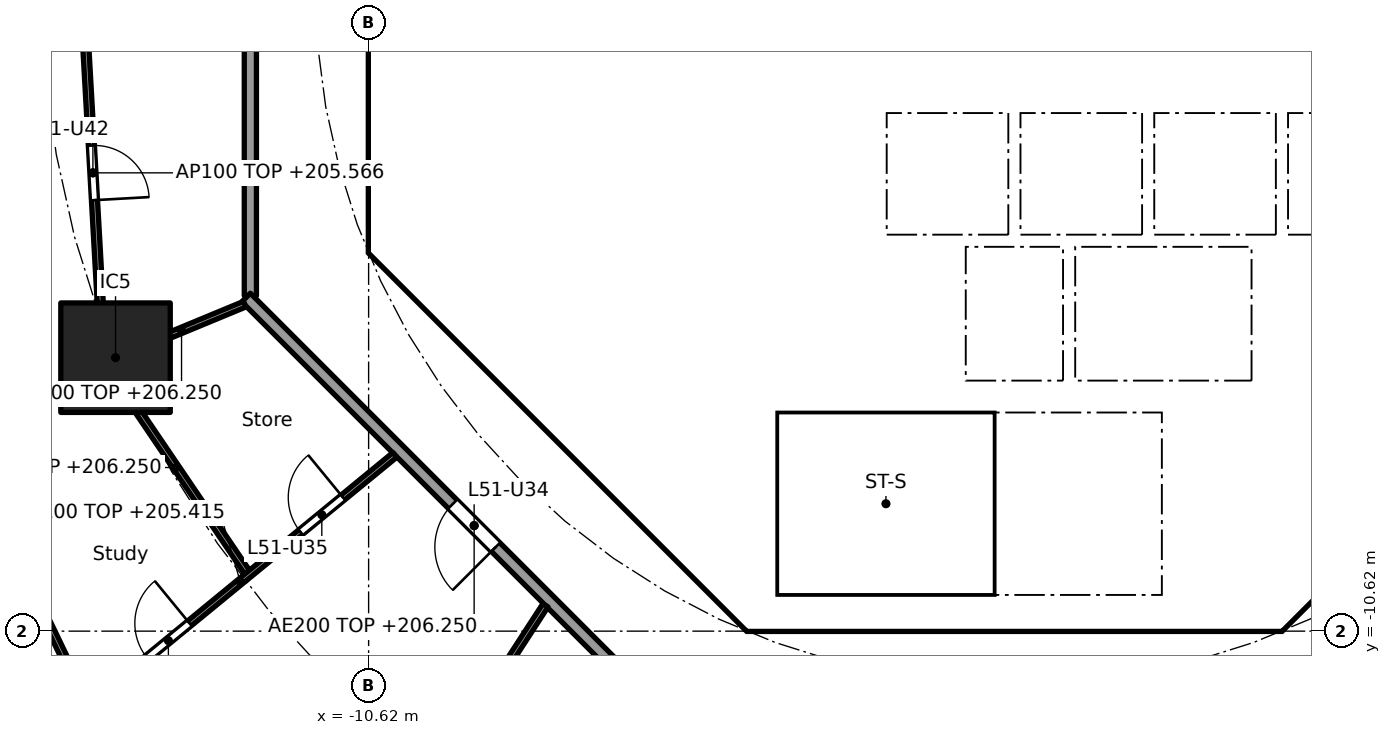
"""IFC4 building model, lengths in metres.
Left out: names, types, materials, properties, quantities, classifications, styles, units other than length and angle.
Written with IfcOpenShell. Run it as: python <this file> out.ifc"""

import sys

from ifc_helpers import new_model, si_unit, direction, frame, frame_2d, origin, origin_2d, place, context, subcontext, project, spatial, polyline, rectangle, outline, extrude, element, fill, save


model = new_model("IFC4")
c1 = context("Model", 3, precision=1e-05, world=origin(), true_north=direction((0.0, 1.0)))
c2 = subcontext(c1, "Body", "Model", "MODEL_VIEW")
j1 = project(units=[si_unit("LENGTHUNIT", "METRE"), si_unit("PLANEANGLEUNIT", "RADIAN")], contexts=[c1])
p1 = place(None, origin())
s1 = spatial("IfcSite", under=j1, at=p1, CompositionType="ELEMENT")
p2 = place(p1, origin())
s2 = spatial("IfcBuilding", under=s1, at=p2, CompositionType="ELEMENT")
p3 = place(p2, frame((0.0, 0.0, 202.9)))
s3 = spatial("IfcBuildingStorey", under=s2, at=p3, CompositionType="ELEMENT", Elevation=202.9)
p4 = place(p3, frame((-14.782, -6.123, 0.0), z_axis=(0.0, 0.0, 1.0), x_axis=(1.0, 0.0, 0.0)))
e1 = element("IfcColumn", 1, at=p4, inside=s3, PredefinedType="COLUMN", context=c2, shape_type="SweptSolid", body=[
    extrude(rectangle(XDim=1.8, YDim=1.8, at=origin_2d()), origin(), (0.0, 0.0, 1.0), 3.7),
])
p5 = place(p3, frame((-10.325, 3.801, 0.0), z_axis=(0.0, 0.0, 1.0), x_axis=(0.0, -1.0, 0.0)))
e2 = element("IfcWall", 2, at=p5, inside=s3, PredefinedType="SHEAR", context=c2, shape_type="SweptSolid", body=[
    extrude(rectangle(XDim=7.602, YDim=0.6, at=frame_2d((3.801, 0.0))), origin(), (0.0, 0.0, 1.0), 3.35),
])
p6 = place(p5, frame((0.651, 0.0, 0.0)))
e3 = element("IfcOpeningElement", 3, at=p6, cuts=e2, PredefinedType="OPENING", context=c2, shape_type="SweptSolid", body=[
    extrude(rectangle(XDim=1.5, YDim=2.1, at=frame_2d((0.75, 1.05))), frame((0.0, 0.31, 0.0), z_axis=(0.0, -1.0, 0.0), x_axis=(1.0, 0.0, 0.0)), (0.0, 0.0, 1.0), 0.62),
])
p7 = place(p5, frame((5.451, 0.0, 0.0)))
e4 = element("IfcOpeningElement", 4, at=p7, cuts=e2, PredefinedType="OPENING", context=c2, shape_type="SweptSolid", body=[
    extrude(rectangle(XDim=1.5, YDim=2.1, at=frame_2d((0.75, 1.05))), frame((0.0, 0.31, 0.0), z_axis=(0.0, -1.0, 0.0), x_axis=(1.0, 0.0, 0.0)), (0.0, 0.0, 1.0), 0.62),
])
p8 = place(p3, frame((-9.988, -4.613, 0.0), z_axis=(0.0, 0.0, 1.0), x_axis=(0.707106781187, -0.707106781187, 0.0)))
e5 = element("IfcWall", 5, at=p8, inside=s3, PredefinedType="SHEAR", context=c2, shape_type="SweptSolid", body=[
    extrude(rectangle(XDim=7.602, YDim=0.6, at=frame_2d((3.801, 0.0))), origin(), (0.0, 0.0, 1.0), 3.35),
])
p9 = place(p8, frame((6.151, 0.0, 0.0)))
e6 = element("IfcOpeningElement", 6, at=p9, cuts=e5, PredefinedType="OPENING", context=c2, shape_type="SweptSolid", body=[
    extrude(rectangle(XDim=1.1, YDim=2.1, at=frame_2d((0.55, 1.05))), frame((0.0, 0.31, 0.0), z_axis=(0.0, -1.0, 0.0), x_axis=(1.0, 0.0, 0.0)), (0.0, 0.0, 1.0), 0.62),
])
p10 = place(p3, frame((4.613, -9.988, 0.0), z_axis=(0.0, 0.0, 1.0), x_axis=(0.707106781187, 0.707106781187, 0.0)))
e7 = element("IfcWall", 7, at=p10, inside=s3, PredefinedType="SHEAR", context=c2, shape_type="SweptSolid", body=[
    extrude(rectangle(XDim=7.602, YDim=0.6, at=frame_2d((3.801, 0.0))), origin(), (0.0, 0.0, 1.0), 3.35),
])
p11 = place(p10, frame((3.201, 0.0, 0.0)))
e8 = element("IfcOpeningElement", 8, at=p11, cuts=e7, PredefinedType="OPENING", context=c2, shape_type="SweptSolid", body=[
    extrude(rectangle(XDim=1.2, YDim=2.1, at=frame_2d((0.6, 1.05))), frame((0.0, 0.31, 0.0), z_axis=(0.0, -1.0, 0.0), x_axis=(1.0, 0.0, 0.0)), (0.0, 0.0, 1.0), 0.62),
])
p12 = place(p3, frame((4.0, -10.025, 0.0), z_axis=(0.0, 0.0, 1.0), x_axis=(0.0, 1.0, 0.0)))
e9 = element("IfcWall", 9, at=p12, inside=s3, PredefinedType="SOLIDWALL", context=c2, shape_type="SweptSolid", body=[
    extrude(rectangle(XDim=3.0, YDim=0.2, at=frame_2d((1.5, 0.0))), origin(), (0.0, 0.0, 1.0), 3.35),
])
p13 = place(p12, frame((0.975, 0.0, 0.0)))
e10 = element("IfcOpeningElement", 10, at=p13, cuts=e9, PredefinedType="OPENING", context=c2, shape_type="SweptSolid", body=[
    extrude(rectangle(XDim=1.1, YDim=2.1, at=frame_2d((0.55, 1.05))), frame((0.0, 0.11, 0.0), z_axis=(0.0, -1.0, 0.0), x_axis=(1.0, 0.0, 0.0)), (0.0, 0.0, 1.0), 0.22),
])
p14 = place(p3, frame((-6.2, -7.827, 0.0), z_axis=(0.0, 0.0, 1.0), x_axis=(0.0, 1.0, 0.0)))
e11 = element("IfcWall", 11, at=p14, inside=s3, PredefinedType="PARTITIONING", context=c2, shape_type="SweptSolid", body=[
    extrude(rectangle(XDim=3.527, YDim=0.15, at=frame_2d((1.763, 0.0))), origin(), (0.0, 0.0, 1.0), 3.35),
])
p15 = place(p14, frame((2.365, 0.0, 0.0)))
e12 = element("IfcOpeningElement", 12, at=p15, cuts=e11, PredefinedType="OPENING", context=c2, shape_type="SweptSolid", body=[
    extrude(rectangle(XDim=0.9, YDim=2.1, at=frame_2d((0.45, 1.05))), frame((0.0, 0.085, 0.0), z_axis=(0.0, -1.0, 0.0), x_axis=(1.0, 0.0, 0.0)), (0.0, 0.0, 1.0), 0.17),
])
p16 = place(p14, frame((0.489, 0.0, 0.0)))
e13 = element("IfcOpeningElement", 13, at=p16, cuts=e11, PredefinedType="OPENING", context=c2, shape_type="SweptSolid", body=[
    extrude(rectangle(XDim=0.9, YDim=2.1, at=frame_2d((0.45, 1.05))), frame((0.0, 0.085, 0.0), z_axis=(0.0, -1.0, 0.0), x_axis=(1.0, 0.0, 0.0)), (0.0, 0.0, 1.0), 0.17),
])
p17 = place(p3, frame((4.0, -6.5, 0.0), z_axis=(0.0, 0.0, 1.0), x_axis=(0.0, 1.0, 0.0)))
e14 = element("IfcWall", 14, at=p17, inside=s3, PredefinedType="SOLIDWALL", context=c2, shape_type="SweptSolid", body=[
    extrude(rectangle(XDim=2.2, YDim=0.2, at=frame_2d((1.1, 0.0))), origin(), (0.0, 0.0, 1.0), 3.35),
])
p18 = place(p17, frame((0.55, 0.0, 0.0)))
e15 = element("IfcOpeningElement", 15, at=p18, cuts=e14, PredefinedType="OPENING", context=c2, shape_type="SweptSolid", body=[
    extrude(rectangle(XDim=1.1, YDim=2.1, at=frame_2d((0.55, 1.05))), frame((0.0, 0.11, 0.0), z_axis=(0.0, -1.0, 0.0), x_axis=(1.0, 0.0, 0.0)), (0.0, 0.0, 1.0), 0.22),
])
p19 = place(p3, frame((-4.0, -6.5, 0.0), z_axis=(0.0, 0.0, 1.0), x_axis=(0.0, 1.0, 0.0)))
e16 = element("IfcWall", 16, at=p19, inside=s3, PredefinedType="SOLIDWALL", context=c2, shape_type="SweptSolid", body=[
    extrude(rectangle(XDim=2.2, YDim=0.2, at=frame_2d((1.1, 0.0))), origin(), (0.0, 0.0, 1.0), 3.35),
])
p20 = place(p19, frame((0.65, 0.0, 0.0)))
e17 = element("IfcOpeningElement", 17, at=p20, cuts=e16, PredefinedType="OPENING", context=c2, shape_type="SweptSolid", body=[
    extrude(rectangle(XDim=0.9, YDim=2.1, at=frame_2d((0.45, 1.05))), frame((0.0, 0.11, 0.0), z_axis=(0.0, -1.0, 0.0), x_axis=(1.0, 0.0, 0.0)), (0.0, 0.0, 1.0), 0.22),
])
p21 = place(p3, frame((-6.7, -2.0, 0.0), z_axis=(0.0, 0.0, 1.0), x_axis=(1.0, 0.0, 0.0)))
e18 = element("IfcWall", 18, at=p21, inside=s3, PredefinedType="SOLIDWALL", context=c2, shape_type="SweptSolid", body=[
    extrude(rectangle(XDim=13.4, YDim=0.2, at=frame_2d((6.7, 0.0))), origin(), (0.0, 0.0, 1.0), 3.35),
])
p22 = place(p21, frame((5.05, 0.0, 0.0)))
e19 = element("IfcOpeningElement", 19, at=p22, cuts=e18, PredefinedType="OPENING", context=c2, shape_type="SweptSolid", body=[
    extrude(rectangle(XDim=1.1, YDim=2.1, at=frame_2d((0.55, 1.05))), frame((0.0, 0.11, 0.0), z_axis=(0.0, -1.0, 0.0), x_axis=(1.0, 0.0, 0.0)), (0.0, 0.0, 1.0), 0.22),
])
p23 = place(p21, frame((7.25, 0.0, 0.0)))
e20 = element("IfcOpeningElement", 20, at=p23, cuts=e18, PredefinedType="OPENING", context=c2, shape_type="SweptSolid", body=[
    extrude(rectangle(XDim=1.1, YDim=2.1, at=frame_2d((0.55, 1.05))), frame((0.0, 0.11, 0.0), z_axis=(0.0, -1.0, 0.0), x_axis=(1.0, 0.0, 0.0)), (0.0, 0.0, 1.0), 0.22),
])
p24 = place(p21, frame((0.75, 0.0, 0.0)))
e21 = element("IfcOpeningElement", 21, at=p24, cuts=e18, PredefinedType="OPENING", context=c2, shape_type="SweptSolid", body=[
    extrude(rectangle(XDim=0.9, YDim=2.1, at=frame_2d((0.45, 1.05))), frame((0.0, 0.11, 0.0), z_axis=(0.0, -1.0, 0.0), x_axis=(1.0, 0.0, 0.0)), (0.0, 0.0, 1.0), 0.22),
])
p25 = place(p21, frame((2.95, 0.0, 0.0)))
e22 = element("IfcOpeningElement", 22, at=p25, cuts=e18, PredefinedType="OPENING", context=c2, shape_type="SweptSolid", body=[
    extrude(rectangle(XDim=0.9, YDim=2.1, at=frame_2d((0.45, 1.05))), frame((0.0, 0.11, 0.0), z_axis=(0.0, -1.0, 0.0), x_axis=(1.0, 0.0, 0.0)), (0.0, 0.0, 1.0), 0.22),
])
p26 = place(p3, origin())
e23 = element("IfcWall", 23, at=p26, inside=s3, PredefinedType="SHEAR", context=c2, shape_type="SweptSolid", body=[
    extrude(outline(polyline([(-10.625, -3.801), (-10.025, -3.801), (-10.025, -4.152), (-9.776, -4.401), (-10.2, -4.825), (-10.625, -4.401), (-10.625, -3.801)])), origin(), (0.0, 0.0, 1.0), 3.35),
])
p27 = place(p3, origin())
e24 = element("IfcWall", 24, at=p27, inside=s3, PredefinedType="SHEAR", context=c2, shape_type="SweptSolid", body=[
    extrude(outline(polyline([(-4.152, -10.025), (4.152, -10.025), (4.401, -9.776), (4.825, -10.2), (4.401, -10.625), (-4.401, -10.625), (-4.825, -10.2), (-4.401, -9.776), (-4.152, -10.025)])), origin(), (0.0, 0.0, 1.0), 3.35),
])
for number, where, z_axis, x_axis in (
    (25, (-0.9, -6.5, 0.0), (0.0, 0.0, 1.0), (0.0, 1.0, 0.0)),
    (26, (0.9, -6.5, 0.0), (0.0, 0.0, 1.0), (0.0, 1.0, 0.0)),
):
    element("IfcWall", number, at=place(p3, frame(where, z_axis=z_axis, x_axis=x_axis)), inside=s3, PredefinedType="SOLIDWALL", context=c2, shape_type="SweptSolid", body=[
        extrude(rectangle(XDim=2.2, YDim=0.2, at=frame_2d((1.1, 0.0))), origin(), (0.0, 0.0, 1.0), 3.35),
    ])
p28 = place(p3, origin())
e27 = element("IfcWall", 27, at=p28, inside=s3, PredefinedType="SOLIDWALL", context=c2, shape_type="SweptSolid", body=[
    extrude(outline(polyline([(-6.7, -2.1), (-6.5, -2.1), (-6.5, -4.1), (-4.5, -4.1), (-4.5, -2.1), (-4.3, -2.1), (-4.3, -4.1), (-2.3, -4.1), (-2.3, -2.1), (-2.1, -2.1), (-2.1, -4.1), (-0.1, -4.1), (-0.1, -2.1), (0.1, -2.1), (0.1, -4.1), (2.1, -4.1), (2.1, -2.1), (2.3, -2.1), (2.3, -4.1), (4.3, -4.1), (4.3, -2.1), (4.5, -2.1), (4.5, -4.1), (6.5, -4.1), (6.5, -2.1), (6.7, -2.1), (6.7, -4.3), (-6.7, -4.3), (-6.7, -2.1)])), origin(), (0.0, 0.0, 1.0), 3.35),
])
p29 = place(p3, frame((-10.025, -4.0, 0.0), z_axis=(0.0, 0.0, 1.0), x_axis=(1.0, 0.0, 0.0)))
e28 = element("IfcWall", 28, at=p29, inside=s3, PredefinedType="PARTITIONING", context=c2, shape_type="SweptSolid", body=[
    extrude(rectangle(XDim=3.325, YDim=0.2, at=frame_2d((1.662, 0.0))), origin(), (0.0, 0.0, 1.0), 3.35),
])
p30 = place(p3, frame((-8.301, -5.8, 0.0), z_axis=(0.0, 0.0, 1.0), x_axis=(1.0, 0.0, 0.0)))
e29 = element("IfcWall", 29, at=p30, inside=s3, PredefinedType="PARTITIONING", context=c2, shape_type="SweptSolid", body=[
    extrude(rectangle(XDim=2.026, YDim=0.15, at=frame_2d((1.013, 0.0))), origin(), (0.0, 0.0, 1.0), 3.35),
])
p31 = place(p3, origin())
e30 = element("IfcWall", 30, at=p31, inside=s3, PredefinedType="SOLIDWALL", context=c2, shape_type="SweptSolid", body=[
    extrude(outline(polyline([(-3.9, -10.025), (-4.1, -10.025), (-4.1, -7.025), (-3.9, -7.025), (-3.9, -10.025)])), origin(), (0.0, 0.0, 1.0), 3.35),
])
p32 = place(p3, origin())
e31 = element("IfcWall", 31, at=p32, inside=s3, PredefinedType="SOLIDWALL", context=c2, shape_type="SweptSolid", body=[
    extrude(outline(polyline([(4.1, -7.025), (-4.1, -7.025), (-4.1, -6.5), (4.1, -6.5), (4.1, -7.025)])), origin(), (0.0, 0.0, 1.0), 3.35),
])
p33 = place(p3, frame((-12.565, 5.304, 0.0), z_axis=(0.0, 0.0, 1.0), x_axis=(0.0, -1.0, 0.0)))
e32 = element("IfcWall", 32, at=p33, inside=s3, PredefinedType="PARTITIONING", context=c2, shape_type="SweptSolid", body=[
    extrude(rectangle(XDim=10.409, YDim=0.2, at=frame_2d((5.205, 0.0))), origin(), (0.0, 0.0, 1.0), 3.35),
])
p34 = place(p3, frame((-12.635, -5.134, 0.0), z_axis=(0.0, 0.0, 1.0), x_axis=(0.707106781187, -0.707106781187, 0.0)))
e33 = element("IfcWall", 33, at=p34, inside=s3, PredefinedType="PARTITIONING", context=c2, shape_type="SweptSolid", body=[
    extrude(rectangle(XDim=10.609, YDim=0.2, at=frame_2d((5.305, 0.0))), origin(), (0.0, 0.0, 1.0), 3.35),
])
p35 = place(p34, frame((4.804, 0.0, 0.0)))
e34 = element("IfcOpeningElement", 34, at=p35, cuts=e33, PredefinedType="OPENING", context=c2, shape_type="SweptSolid", body=[
    extrude(rectangle(XDim=1.0, YDim=2.1, at=frame_2d((0.5, 1.05))), frame((0.0, 0.11, 0.0), z_axis=(0.0, -1.0, 0.0), x_axis=(1.0, 0.0, 0.0)), (0.0, 0.0, 1.0), 0.22),
])
p36 = place(p3, frame((-15.331, 0.05, 0.0), z_axis=(0.0, 0.0, 1.0), x_axis=(0.056325291522, -0.998412470643, 0.0)))
e35 = element("IfcWall", 35, at=p36, inside=s3, PredefinedType="PARTITIONING", context=c2, shape_type="SweptSolid", body=[
    extrude(rectangle(XDim=6.276, YDim=0.1, at=frame_2d((3.138, 0.0))), origin(), (0.0, 0.0, 1.0), 2.666),
])
p37 = place(p36, frame((2.688, 0.0, 0.0)))
e36 = element("IfcOpeningElement", 36, at=p37, cuts=e35, PredefinedType="OPENING", context=c2, shape_type="SweptSolid", body=[
    extrude(rectangle(XDim=0.9, YDim=2.1, at=frame_2d((0.45, 1.05))), frame((0.0, 0.06, 0.0), z_axis=(0.0, -1.0, 0.0), x_axis=(1.0, 0.0, 0.0)), (0.0, 0.0, 1.0), 0.12),
])
p38 = place(p3, frame((-12.657, -5.243, 0.0), z_axis=(0.0, 0.0, 1.0), x_axis=(-0.923864733477, -0.382719158442, 0.0)))
e37 = element("IfcWall", 37, at=p38, inside=s3, PredefinedType="PARTITIONING", context=c2, shape_type="SweptSolid", body=[
    extrude(rectangle(XDim=2.25, YDim=0.1, at=frame_2d((1.125, 0.0))), origin(), (0.0, 0.0, 1.0), 3.35),
])
p39 = place(p3, frame((-14.952, -6.208, 0.0), z_axis=(0.0, 0.0, 1.0), x_axis=(0.561064907171, -0.827771810308, 0.0)))
e38 = element("IfcWall", 38, at=p39, inside=s3, PredefinedType="PARTITIONING", context=c2, shape_type="SweptSolid", body=[
    extrude(rectangle(XDim=4.159, YDim=0.1, at=frame_2d((2.079, 0.0))), origin(), (0.0, 0.0, 1.0), 3.35),
])
p40 = place(p3, frame((-17.669, -6.809, 0.0), z_axis=(0.0, 0.0, 1.0), x_axis=(0.434040130629, -0.900893536997, 0.0)))
e39 = element("IfcWall", 39, at=p40, inside=s3, PredefinedType="PARTITIONING", context=c2, shape_type="SweptSolid", body=[
    extrude(rectangle(XDim=5.558, YDim=0.1, at=frame_2d((2.779, 0.0))), origin(), (0.0, 0.0, 1.0), 3.35),
])
p41 = place(p3, frame((-10.189, -7.721, 0.0), z_axis=(0.0, 0.0, 1.0), x_axis=(-0.773121441079, -0.634258021112, 0.0)))
e40 = element("IfcWall", 40, at=p41, inside=s3, PredefinedType="PARTITIONING", context=c2, shape_type="SweptSolid", body=[
    extrude(rectangle(XDim=6.577, YDim=0.1, at=frame_2d((3.289, 0.0))), origin(), (0.0, 0.0, 1.0), 2.515),
])
p42 = place(p41, frame((1.104, 0.0, 0.0)))
e41 = element("IfcOpeningElement", 41, at=p42, cuts=e40, PredefinedType="OPENING", context=c2, shape_type="SweptSolid", body=[
    extrude(rectangle(XDim=0.9, YDim=2.1, at=frame_2d((0.45, 1.05))), frame((0.0, 0.06, 0.0), z_axis=(0.0, -1.0, 0.0), x_axis=(1.0, 0.0, 0.0)), (0.0, 0.0, 1.0), 0.12),
])
p43 = place(p41, frame((4.367, 0.0, 0.0)))
e42 = element("IfcOpeningElement", 42, at=p43, cuts=e40, PredefinedType="OPENING", context=c2, shape_type="SweptSolid", body=[
    extrude(rectangle(XDim=0.9, YDim=2.1, at=frame_2d((0.45, 1.05))), frame((0.0, 0.06, 0.0), z_axis=(0.0, -1.0, 0.0), x_axis=(1.0, 0.0, 0.0)), (0.0, 0.0, 1.0), 0.12),
])
p44 = place(p3, frame((-7.712, -10.195, 0.0), z_axis=(0.0, 0.0, 1.0), x_axis=(-0.544179442551, -0.838968851809, 0.0)))
e43 = element("IfcWall", 43, at=p44, inside=s3, PredefinedType="PARTITIONING", context=c2, shape_type="SweptSolid", body=[
    extrude(rectangle(XDim=7.566, YDim=0.1, at=frame_2d((3.783, 0.0))), origin(), (0.0, 0.0, 1.0), 2.515),
])
p45 = place(p44, frame((1.343, 0.0, 0.0)))
e44 = element("IfcOpeningElement", 44, at=p45, cuts=e43, PredefinedType="OPENING", context=c2, shape_type="SweptSolid", body=[
    extrude(rectangle(XDim=0.9, YDim=2.1, at=frame_2d((0.45, 1.05))), frame((0.0, 0.06, 0.0), z_axis=(0.0, -1.0, 0.0), x_axis=(1.0, 0.0, 0.0)), (0.0, 0.0, 1.0), 0.12),
])
p46 = place(p44, frame((5.101, 0.0, 0.0)))
e45 = element("IfcOpeningElement", 45, at=p46, cuts=e43, PredefinedType="OPENING", context=c2, shape_type="SweptSolid", body=[
    extrude(rectangle(XDim=0.9, YDim=2.1, at=frame_2d((0.45, 1.05))), frame((0.0, 0.06, 0.0), z_axis=(0.0, -1.0, 0.0), x_axis=(1.0, 0.0, 0.0)), (0.0, 0.0, 1.0), 0.12),
])
p47 = place(p22, origin())
e46 = element("IfcDoor", 46, at=p47, inside=s3, OperationType="DOUBLE_DOOR_SLIDING", PredefinedType="DOOR", context=c2, shape_type="SweptSolid", body=[
    extrude(rectangle(XDim=1.1, YDim=2.1, at=frame_2d((0.55, 1.05))), frame((0.0, 0.025, 0.0), z_axis=(0.0, -1.0, 0.0), x_axis=(1.0, 0.0, 0.0)), (0.0, 0.0, 1.0), 0.05),
])
fill(e19, e46)
p48 = place(p23, origin())
e47 = element("IfcDoor", 47, at=p48, inside=s3, OperationType="DOUBLE_DOOR_SLIDING", PredefinedType="DOOR", context=c2, shape_type="SweptSolid", body=[
    extrude(rectangle(XDim=1.1, YDim=2.1, at=frame_2d((0.55, 1.05))), frame((0.0, 0.025, 0.0), z_axis=(0.0, -1.0, 0.0), x_axis=(1.0, 0.0, 0.0)), (0.0, 0.0, 1.0), 0.05),
])
fill(e20, e47)
p49 = place(p18, origin())
e48 = element("IfcDoor", 48, at=p49, inside=s3, OperationType="DOUBLE_DOOR_SLIDING", PredefinedType="DOOR", context=c2, shape_type="SweptSolid", body=[
    extrude(rectangle(XDim=1.1, YDim=2.1, at=frame_2d((0.55, 1.05))), frame((0.0, 0.025, 0.0), z_axis=(0.0, -1.0, 0.0), x_axis=(1.0, 0.0, 0.0)), (0.0, 0.0, 1.0), 0.05),
])
fill(e15, e48)
p50 = place(p13, origin())
e49 = element("IfcDoor", 49, at=p50, inside=s3, OperationType="SINGLE_SWING_RIGHT", PredefinedType="DOOR", context=c2, shape_type="SweptSolid", body=[
    extrude(rectangle(XDim=1.1, YDim=2.1, at=frame_2d((0.55, 1.05))), frame((0.0, 0.025, 0.0), z_axis=(0.0, -1.0, 0.0), x_axis=(1.0, 0.0, 0.0)), (0.0, 0.0, 1.0), 0.05),
])
fill(e10, e49)
p51 = place(p15, origin())
e50 = element("IfcDoor", 50, at=p51, inside=s3, OperationType="SINGLE_SWING_RIGHT", PredefinedType="DOOR", context=c2, shape_type="SweptSolid", body=[
    extrude(rectangle(XDim=0.9, YDim=2.1, at=frame_2d((0.45, 1.05))), frame((0.0, 0.025, 0.0), z_axis=(0.0, -1.0, 0.0), x_axis=(1.0, 0.0, 0.0)), (0.0, 0.0, 1.0), 0.05),
])
fill(e12, e50)
p52 = place(p16, origin())
e51 = element("IfcDoor", 51, at=p52, inside=s3, OperationType="SINGLE_SWING_RIGHT", PredefinedType="DOOR", context=c2, shape_type="SweptSolid", body=[
    extrude(rectangle(XDim=0.9, YDim=2.1, at=frame_2d((0.45, 1.05))), frame((0.0, 0.025, 0.0), z_axis=(0.0, -1.0, 0.0), x_axis=(1.0, 0.0, 0.0)), (0.0, 0.0, 1.0), 0.05),
])
fill(e13, e51)
p53 = place(p20, frame((0.9, 0.0, 0.0), x_axis=(-1.0, 0.0, 0.0)))
e52 = element("IfcDoor", 52, at=p53, inside=s3, OperationType="SINGLE_SWING_LEFT", PredefinedType="DOOR", context=c2, shape_type="SweptSolid", body=[
    extrude(rectangle(XDim=0.9, YDim=2.1, at=frame_2d((0.45, 1.05))), frame((0.0, 0.025, 0.0), z_axis=(0.0, -1.0, 0.0), x_axis=(1.0, 0.0, 0.0)), (0.0, 0.0, 1.0), 0.05),
])
fill(e17, e52)
p54 = place(p24, frame((0.9, 0.0, 0.0), x_axis=(-1.0, 0.0, 0.0)))
e53 = element("IfcDoor", 53, at=p54, inside=s3, OperationType="SINGLE_SWING_RIGHT", PredefinedType="DOOR", context=c2, shape_type="SweptSolid", body=[
    extrude(rectangle(XDim=0.9, YDim=2.1, at=frame_2d((0.45, 1.05))), frame((0.0, 0.025, 0.0), z_axis=(0.0, -1.0, 0.0), x_axis=(1.0, 0.0, 0.0)), (0.0, 0.0, 1.0), 0.05),
])
fill(e21, e53)
p55 = place(p25, frame((0.9, 0.0, 0.0), x_axis=(-1.0, 0.0, 0.0)))
e54 = element("IfcDoor", 54, at=p55, inside=s3, OperationType="SINGLE_SWING_RIGHT", PredefinedType="DOOR", context=c2, shape_type="SweptSolid", body=[
    extrude(rectangle(XDim=0.9, YDim=2.1, at=frame_2d((0.45, 1.05))), frame((0.0, 0.025, 0.0), z_axis=(0.0, -1.0, 0.0), x_axis=(1.0, 0.0, 0.0)), (0.0, 0.0, 1.0), 0.05),
])
fill(e22, e54)
p56 = place(p7, origin())
e55 = element("IfcDoor", 55, at=p56, inside=s3, OperationType="DOUBLE_DOOR_SINGLE_SWING", PredefinedType="DOOR", context=c2, shape_type="SweptSolid", body=[
    extrude(rectangle(XDim=1.5, YDim=2.1, at=frame_2d((0.75, 1.05))), frame((0.0, 0.025, 0.0), z_axis=(0.0, -1.0, 0.0), x_axis=(1.0, 0.0, 0.0)), (0.0, 0.0, 1.0), 0.05),
])
fill(e4, e55)
p57 = place(p9, origin())
e56 = element("IfcDoor", 56, at=p57, inside=s3, OperationType="SINGLE_SWING_RIGHT", PredefinedType="DOOR", context=c2, shape_type="SweptSolid", body=[
    extrude(rectangle(XDim=1.1, YDim=2.1, at=frame_2d((0.55, 1.05))), frame((0.0, 0.025, 0.0), z_axis=(0.0, -1.0, 0.0), x_axis=(1.0, 0.0, 0.0)), (0.0, 0.0, 1.0), 0.05),
])
fill(e6, e56)
p58 = place(p35, frame((1.0, 0.0, 0.0), x_axis=(-1.0, 0.0, 0.0)))
e57 = element("IfcDoor", 57, at=p58, inside=s3, OperationType="SINGLE_SWING_LEFT", PredefinedType="DOOR", context=c2, shape_type="SweptSolid", body=[
    extrude(rectangle(XDim=1.0, YDim=2.1, at=frame_2d((0.5, 1.05))), frame((0.0, 0.025, 0.0), z_axis=(0.0, -1.0, 0.0), x_axis=(1.0, 0.0, 0.0)), (0.0, 0.0, 1.0), 0.05),
])
fill(e34, e57)
p59 = place(p42, frame((0.9, 0.0, 0.0), x_axis=(-1.0, 0.0, 0.0)))
e58 = element("IfcDoor", 58, at=p59, inside=s3, OperationType="SINGLE_SWING_RIGHT", PredefinedType="DOOR", context=c2, shape_type="SweptSolid", body=[
    extrude(rectangle(XDim=0.9, YDim=2.1, at=frame_2d((0.45, 1.05))), frame((0.0, 0.025, 0.0), z_axis=(0.0, -1.0, 0.0), x_axis=(1.0, 0.0, 0.0)), (0.0, 0.0, 1.0), 0.05),
])
fill(e41, e58)
p60 = place(p43, frame((0.9, 0.0, 0.0), x_axis=(-1.0, 0.0, 0.0)))
e59 = element("IfcDoor", 59, at=p60, inside=s3, OperationType="SINGLE_SWING_RIGHT", PredefinedType="DOOR", context=c2, shape_type="SweptSolid", body=[
    extrude(rectangle(XDim=0.9, YDim=2.1, at=frame_2d((0.45, 1.05))), frame((0.0, 0.025, 0.0), z_axis=(0.0, -1.0, 0.0), x_axis=(1.0, 0.0, 0.0)), (0.0, 0.0, 1.0), 0.05),
])
fill(e42, e59)
p61 = place(p37, origin())
e60 = element("IfcDoor", 60, at=p61, inside=s3, OperationType="SINGLE_SWING_RIGHT", PredefinedType="DOOR", context=c2, shape_type="SweptSolid", body=[
    extrude(rectangle(XDim=0.9, YDim=2.1, at=frame_2d((0.45, 1.05))), frame((0.0, 0.025, 0.0), z_axis=(0.0, -1.0, 0.0), x_axis=(1.0, 0.0, 0.0)), (0.0, 0.0, 1.0), 0.05),
])
fill(e36, e60)
save(model, sys.argv[1])
